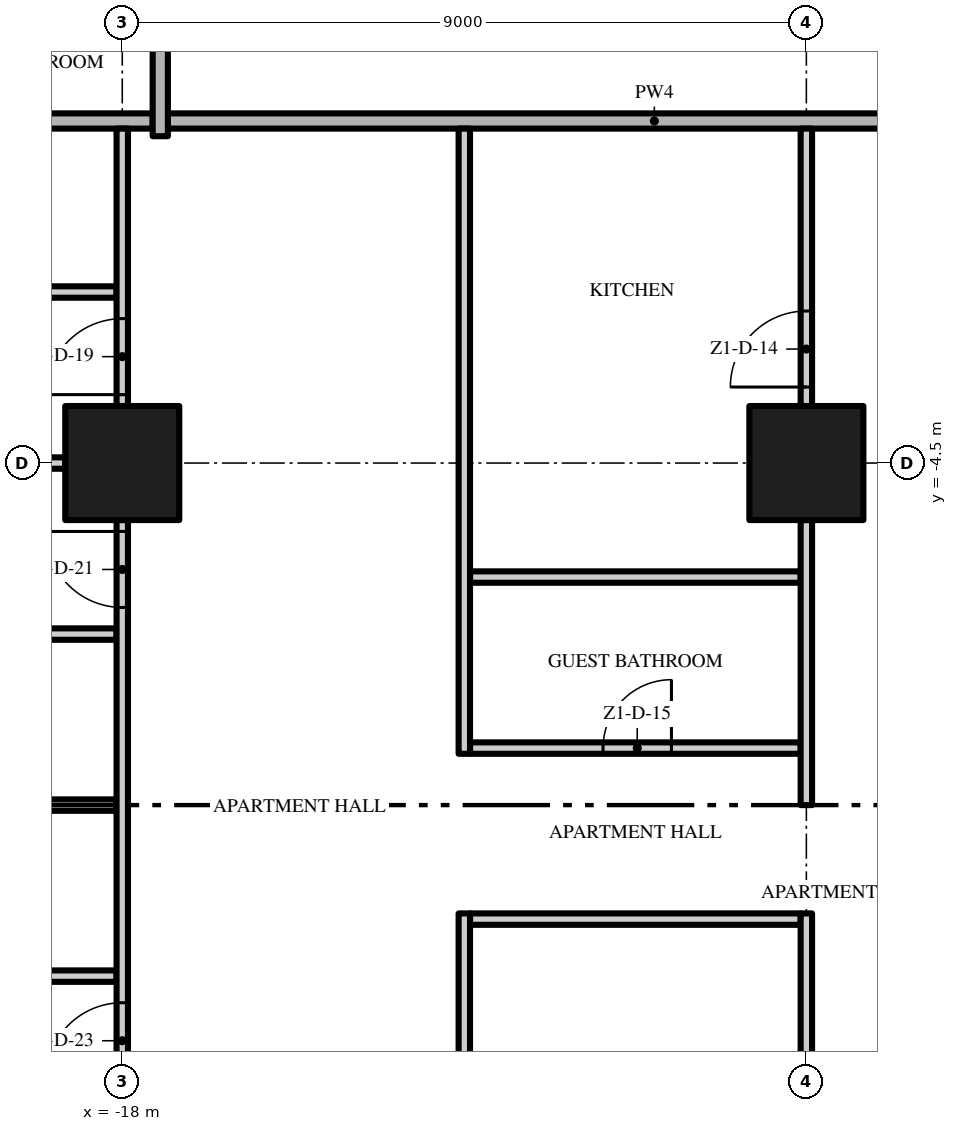
"""IFC4 building model, lengths in metres.
Left out: names, types, materials, properties, quantities, classifications, styles, units other than length and angle.
Written with IfcOpenShell. Run it as: python <this file> out.ifc"""

import sys

from ifc_helpers import new_model, si_unit, direction, frame, frame_2d, origin, origin_2d, place, context, subcontext, project, spatial, rectangle, extrude, element, fill, save


model = new_model("IFC4")
c1 = context("Model", 3, precision=1e-05, world=origin(), true_north=direction((0.0, 1.0)))
c2 = subcontext(c1, "Body", "Model", "MODEL_VIEW")
j1 = project(units=[si_unit("LENGTHUNIT", "METRE"), si_unit("PLANEANGLEUNIT", "RADIAN")], contexts=[c1])
p1 = place(None, origin())
s1 = spatial("IfcSite", under=j1, at=p1, CompositionType="ELEMENT")
p2 = place(p1, origin())
s2 = spatial("IfcBuilding", under=s1, at=p2, CompositionType="ELEMENT")
p3 = place(p2, frame((0.0, 0.0, 53.0)))
s3 = spatial("IfcBuildingStorey", under=s2, at=p3, CompositionType="ELEMENT", Elevation=53.0)
for number, where, z_axis, x_axis in (
    (1, (-18.0, -4.5, 0.0), (0.0, 0.0, 1.0), (1.0, 0.0, 0.0)),
    (2, (-9.0, -4.5, 0.0), (0.0, 0.0, 1.0), (1.0, 0.0, 0.0)),
):
    element("IfcColumn", number, at=place(p3, frame(where, z_axis=z_axis, x_axis=x_axis)), inside=s3, PredefinedType="COLUMN", context=c2, shape_type="SweptSolid", body=[
        extrude(rectangle(XDim=1.5, YDim=1.5, at=origin_2d()), origin(), (0.0, 0.0, 1.0), 3.5),
    ])
p4 = place(p3, frame((-20.925, -11.25, 0.0), z_axis=(0.0, 0.0, 1.0), x_axis=(1.0, 0.0, 0.0)))
e3 = element("IfcWall", 3, at=p4, inside=s3, PredefinedType="PARTITIONING", context=c2, shape_type="SweptSolid", body=[
    extrude(rectangle(XDim=2.85, YDim=0.15, at=frame_2d((1.425, 0.0))), origin(), (0.0, 0.0, 1.0), 3.5),
])
p5 = place(p3, frame((-13.425, -10.5, 0.0), z_axis=(0.0, 0.0, 1.0), x_axis=(1.0, 0.0, 0.0)))
e4 = element("IfcWall", 4, at=p5, inside=s3, PredefinedType="PARTITIONING", context=c2, shape_type="SweptSolid", body=[
    extrude(rectangle(XDim=4.35, YDim=0.15, at=frame_2d((2.175, 0.0))), origin(), (0.0, 0.0, 1.0), 3.5),
])
p6 = place(p3, frame((-20.925, -9.0, 0.0), z_axis=(0.0, 0.0, 1.0), x_axis=(1.0, 0.0, 0.0)))
e5 = element("IfcWall", 5, at=p6, inside=s3, PredefinedType="PARTITIONING", context=c2, shape_type="SweptSolid", body=[
    extrude(rectangle(XDim=2.85, YDim=0.15, at=frame_2d((1.425, 0.0))), origin(), (0.0, 0.0, 1.0), 3.5),
])
p7 = place(p3, frame((-13.425, -8.25, 0.0), z_axis=(0.0, 0.0, 1.0), x_axis=(1.0, 0.0, 0.0)))
e6 = element("IfcWall", 6, at=p7, inside=s3, PredefinedType="PARTITIONING", context=c2, shape_type="SweptSolid", body=[
    extrude(rectangle(XDim=4.35, YDim=0.15, at=frame_2d((2.175, 0.0))), origin(), (0.0, 0.0, 1.0), 3.5),
])
p8 = place(p7, frame((1.75, 0.0, 0.0)))
e7 = element("IfcOpeningElement", 7, at=p8, cuts=e6, PredefinedType="OPENING", context=c2, shape_type="SweptSolid", body=[
    extrude(rectangle(XDim=0.9, YDim=2.1, at=frame_2d((0.45, 1.05))), frame((0.0, 0.085, 0.0), z_axis=(0.0, -1.0, 0.0), x_axis=(1.0, 0.0, 0.0)), (0.0, 0.0, 1.0), 0.17),
])
p9 = place(p3, frame((-20.925, -6.75, 0.0), z_axis=(0.0, 0.0, 1.0), x_axis=(1.0, 0.0, 0.0)))
e8 = element("IfcWall", 8, at=p9, inside=s3, PredefinedType="PARTITIONING", context=c2, shape_type="SweptSolid", body=[
    extrude(rectangle(XDim=2.85, YDim=0.15, at=frame_2d((1.425, 0.0))), origin(), (0.0, 0.0, 1.0), 3.5),
])
p10 = place(p3, frame((-13.425, -6.0, 0.0), z_axis=(0.0, 0.0, 1.0), x_axis=(1.0, 0.0, 0.0)))
e9 = element("IfcWall", 9, at=p10, inside=s3, PredefinedType="PARTITIONING", context=c2, shape_type="SweptSolid", body=[
    extrude(rectangle(XDim=4.35, YDim=0.15, at=frame_2d((2.175, 0.0))), origin(), (0.0, 0.0, 1.0), 3.5),
])
p11 = place(p3, frame((-25.6, -4.5, 0.0), z_axis=(0.0, 0.0, 1.0), x_axis=(1.0, 0.0, 0.0)))
e10 = element("IfcWall", 10, at=p11, inside=s3, PredefinedType="PARTITIONING", context=c2, shape_type="SweptSolid", body=[
    extrude(rectangle(XDim=6.85, YDim=0.15, at=frame_2d((3.425, 0.0))), origin(), (0.0, 0.0, 1.0), 3.5),
])
p12 = place(p3, frame((-20.925, -2.25, 0.0), z_axis=(0.0, 0.0, 1.0), x_axis=(1.0, 0.0, 0.0)))
e11 = element("IfcWall", 11, at=p12, inside=s3, PredefinedType="PARTITIONING", context=c2, shape_type="SweptSolid", body=[
    extrude(rectangle(XDim=2.85, YDim=0.15, at=frame_2d((1.425, 0.0))), origin(), (0.0, 0.0, 1.0), 3.5),
])
p13 = place(p3, frame((-17.4, 0.0, 0.0), z_axis=(0.0, 0.0, 1.0), x_axis=(1.0, 0.0, 0.0)))
e12 = element("IfcWall", 12, at=p13, inside=s3, PredefinedType="PARTITIONING", context=c2, shape_type="SweptSolid", body=[
    extrude(rectangle(XDim=12.8, YDim=0.2, at=frame_2d((6.4, 0.0))), origin(), (0.0, 0.0, 1.0), 3.5),
])
p14 = place(p3, frame((-26.7, 0.0, 0.0), z_axis=(0.0, 0.0, 1.0), x_axis=(1.0, 0.0, 0.0)))
e13 = element("IfcWall", 13, at=p14, inside=s3, PredefinedType="PARTITIONING", context=c2, shape_type="SweptSolid", body=[
    extrude(rectangle(XDim=9.1, YDim=0.2, at=frame_2d((4.55, 0.0))), origin(), (0.0, 0.0, 1.0), 3.5),
])
p15 = place(p3, frame((-18.0, -12.75, 0.0), z_axis=(0.0, 0.0, 1.0), x_axis=(0.0, 1.0, 0.0)))
e14 = element("IfcWall", 14, at=p15, inside=s3, PredefinedType="PARTITIONING", context=c2, shape_type="SweptSolid", body=[
    extrude(rectangle(XDim=7.5, YDim=0.15, at=frame_2d((3.75, 0.0))), origin(), (0.0, 0.0, 1.0), 3.5),
])
p16 = place(p15, frame((6.35, 0.0, 0.0)))
e15 = element("IfcOpeningElement", 15, at=p16, cuts=e14, PredefinedType="OPENING", context=c2, shape_type="SweptSolid", body=[
    extrude(rectangle(XDim=1.0, YDim=2.4, at=frame_2d((0.5, 1.2))), frame((0.0, 0.085, 0.0), z_axis=(0.0, -1.0, 0.0), x_axis=(1.0, 0.0, 0.0)), (0.0, 0.0, 1.0), 0.17),
])
p17 = place(p15, frame((0.15, 0.0, 0.0)))
e16 = element("IfcOpeningElement", 16, at=p17, cuts=e14, PredefinedType="OPENING", context=c2, shape_type="SweptSolid", body=[
    extrude(rectangle(XDim=1.0, YDim=2.4, at=frame_2d((0.5, 1.2))), frame((0.0, 0.085, 0.0), z_axis=(0.0, -1.0, 0.0), x_axis=(1.0, 0.0, 0.0)), (0.0, 0.0, 1.0), 0.17),
])
p18 = place(p3, frame((-18.0, -3.75, 0.0), z_axis=(0.0, 0.0, 1.0), x_axis=(0.0, 1.0, 0.0)))
e17 = element("IfcWall", 17, at=p18, inside=s3, PredefinedType="PARTITIONING", context=c2, shape_type="SweptSolid", body=[
    extrude(rectangle(XDim=3.65, YDim=0.15, at=frame_2d((1.825, 0.0))), origin(), (0.0, 0.0, 1.0), 3.5),
])
p19 = place(p18, frame((0.15, 0.0, 0.0)))
e18 = element("IfcOpeningElement", 18, at=p19, cuts=e17, PredefinedType="OPENING", context=c2, shape_type="SweptSolid", body=[
    extrude(rectangle(XDim=1.0, YDim=2.4, at=frame_2d((0.5, 1.2))), frame((0.0, 0.085, 0.0), z_axis=(0.0, -1.0, 0.0), x_axis=(1.0, 0.0, 0.0)), (0.0, 0.0, 1.0), 0.17),
])
p20 = place(p3, frame((-17.5, -0.2, 0.0), z_axis=(0.0, 0.0, 1.0), x_axis=(0.0, 1.0, 0.0)))
e19 = element("IfcWall", 19, at=p20, inside=s3, PredefinedType="PARTITIONING", context=c2, shape_type="SweptSolid", body=[
    extrude(rectangle(XDim=3.95, YDim=0.2, at=frame_2d((1.975, 0.0))), origin(), (0.0, 0.0, 1.0), 3.5),
])
p21 = place(p3, frame((-13.5, -10.425, 0.0), z_axis=(0.0, 0.0, 1.0), x_axis=(0.0, -1.0, 0.0)))
e20 = element("IfcWall", 20, at=p21, inside=s3, PredefinedType="PARTITIONING", context=c2, shape_type="SweptSolid", body=[
    extrude(rectangle(XDim=11.775, YDim=0.15, at=frame_2d((5.888, 0.0))), origin(), (0.0, 0.0, 1.0), 3.5),
])
p22 = place(p21, frame((2.625, 0.0, 0.0)))
e21 = element("IfcOpeningElement", 21, at=p22, cuts=e20, PredefinedType="OPENING", context=c2, shape_type="SweptSolid", body=[
    extrude(rectangle(XDim=0.9, YDim=2.1, at=frame_2d((0.45, 1.05))), frame((0.0, 0.085, 0.0), z_axis=(0.0, -1.0, 0.0), x_axis=(1.0, 0.0, 0.0)), (0.0, 0.0, 1.0), 0.17),
])
p23 = place(p3, frame((-13.5, -8.325, 0.0), z_axis=(0.0, 0.0, 1.0), x_axis=(0.0, 1.0, 0.0)))
e22 = element("IfcWall", 22, at=p23, inside=s3, PredefinedType="PARTITIONING", context=c2, shape_type="SweptSolid", body=[
    extrude(rectangle(XDim=8.225, YDim=0.15, at=frame_2d((4.112, 0.0))), origin(), (0.0, 0.0, 1.0), 3.5),
])
p24 = place(p3, frame((-9.0, -12.75, 0.0), z_axis=(0.0, 0.0, 1.0), x_axis=(0.0, 1.0, 0.0)))
e23 = element("IfcWall", 23, at=p24, inside=s3, PredefinedType="PARTITIONING", context=c2, shape_type="SweptSolid", body=[
    extrude(rectangle(XDim=2.325, YDim=0.15, at=frame_2d((1.163, 0.0))), origin(), (0.0, 0.0, 1.0), 3.5),
])
p25 = place(p3, frame((-9.0, -9.0, 0.0), z_axis=(0.0, 0.0, 1.0), x_axis=(0.0, 1.0, 0.0)))
e24 = element("IfcWall", 24, at=p25, inside=s3, PredefinedType="PARTITIONING", context=c2, shape_type="SweptSolid", body=[
    extrude(rectangle(XDim=3.75, YDim=0.15, at=frame_2d((1.875, 0.0))), origin(), (0.0, 0.0, 1.0), 3.5),
])
p26 = place(p3, frame((-9.0, -3.75, 0.0), z_axis=(0.0, 0.0, 1.0), x_axis=(0.0, 1.0, 0.0)))
e25 = element("IfcWall", 25, at=p26, inside=s3, PredefinedType="PARTITIONING", context=c2, shape_type="SweptSolid", body=[
    extrude(rectangle(XDim=3.65, YDim=0.15, at=frame_2d((1.825, 0.0))), origin(), (0.0, 0.0, 1.0), 3.5),
])
p27 = place(p26, frame((0.25, 0.0, 0.0)))
e26 = element("IfcOpeningElement", 26, at=p27, cuts=e25, PredefinedType="OPENING", context=c2, shape_type="SweptSolid", body=[
    extrude(rectangle(XDim=1.0, YDim=2.4, at=frame_2d((0.5, 1.2))), frame((0.0, 0.085, 0.0), z_axis=(0.0, -1.0, 0.0), x_axis=(1.0, 0.0, 0.0)), (0.0, 0.0, 1.0), 0.17),
])
p28 = place(p27, origin())
e27 = element("IfcDoor", 27, at=p28, inside=s3, OperationType="SINGLE_SWING_LEFT", PredefinedType="DOOR", context=c2, shape_type="SweptSolid", body=[
    extrude(rectangle(XDim=1.0, YDim=2.4, at=frame_2d((0.5, 1.2))), frame((0.0, 0.025, 0.0), z_axis=(0.0, -1.0, 0.0), x_axis=(1.0, 0.0, 0.0)), (0.0, 0.0, 1.0), 0.05),
])
fill(e26, e27)
p29 = place(p8, origin())
e28 = element("IfcDoor", 28, at=p29, inside=s3, OperationType="SINGLE_SWING_RIGHT", PredefinedType="DOOR", context=c2, shape_type="SweptSolid", body=[
    extrude(rectangle(XDim=0.9, YDim=2.1, at=frame_2d((0.45, 1.05))), frame((0.0, 0.025, 0.0), z_axis=(0.0, -1.0, 0.0), x_axis=(1.0, 0.0, 0.0)), (0.0, 0.0, 1.0), 0.05),
])
fill(e7, e28)
p30 = place(p19, origin())
e29 = element("IfcDoor", 29, at=p30, inside=s3, OperationType="SINGLE_SWING_LEFT", PredefinedType="DOOR", context=c2, shape_type="SweptSolid", body=[
    extrude(rectangle(XDim=1.0, YDim=2.4, at=frame_2d((0.5, 1.2))), frame((0.0, 0.025, 0.0), z_axis=(0.0, -1.0, 0.0), x_axis=(1.0, 0.0, 0.0)), (0.0, 0.0, 1.0), 0.05),
])
fill(e18, e29)
p31 = place(p16, origin())
e30 = element("IfcDoor", 30, at=p31, inside=s3, OperationType="SINGLE_SWING_RIGHT", PredefinedType="DOOR", context=c2, shape_type="SweptSolid", body=[
    extrude(rectangle(XDim=1.0, YDim=2.4, at=frame_2d((0.5, 1.2))), frame((0.0, 0.025, 0.0), z_axis=(0.0, -1.0, 0.0), x_axis=(1.0, 0.0, 0.0)), (0.0, 0.0, 1.0), 0.05),
])
fill(e15, e30)
p32 = place(p17, origin())
e31 = element("IfcDoor", 31, at=p32, inside=s3, OperationType="SINGLE_SWING_LEFT", PredefinedType="DOOR", context=c2, shape_type="SweptSolid", body=[
    extrude(rectangle(XDim=1.0, YDim=2.4, at=frame_2d((0.5, 1.2))), frame((0.0, 0.025, 0.0), z_axis=(0.0, -1.0, 0.0), x_axis=(1.0, 0.0, 0.0)), (0.0, 0.0, 1.0), 0.05),
])
fill(e16, e31)
save(model, sys.argv[1])
